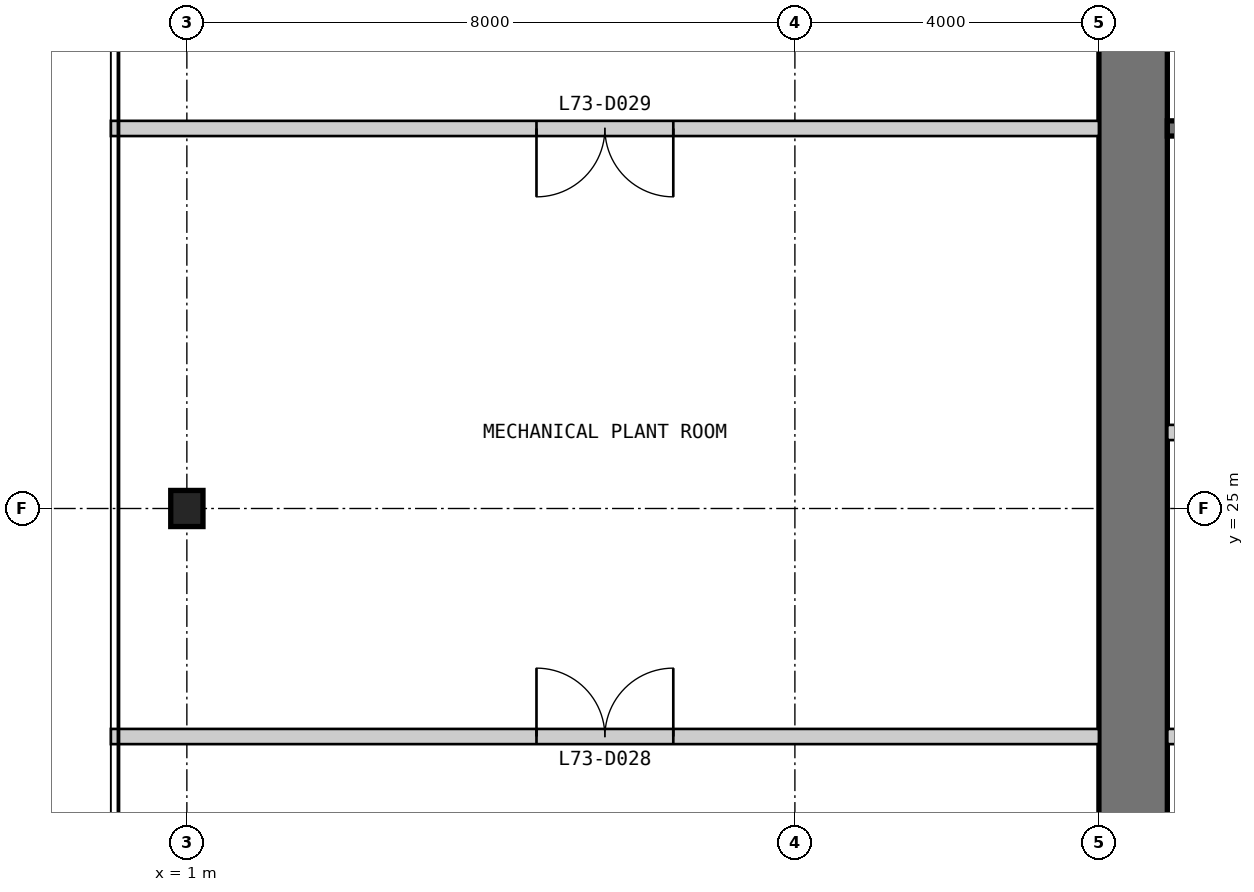
"""IFC4 building model, lengths in metres.
Left out: names, types, materials, properties, quantities, classifications, styles, units other than length and angle.
Written with IfcOpenShell. Run it as: python <this file> out.ifc"""

import sys

from ifc_helpers import new_model, si_unit, direction, frame, frame_2d, origin, origin_2d, place, context, subcontext, project, spatial, polyline, rectangle, i_section, outline, extrude, element, fill, save


model = new_model("IFC4")
c1 = context("Model", 3, precision=1e-05, world=origin(), true_north=direction((0.0, 1.0)))
c2 = subcontext(c1, "Body", "Model", "MODEL_VIEW")
j1 = project(units=[si_unit("LENGTHUNIT", "METRE"), si_unit("PLANEANGLEUNIT", "RADIAN")], contexts=[c1])
p1 = place(None, origin())
s1 = spatial("IfcSite", under=j1, at=p1, CompositionType="ELEMENT")
p2 = place(p1, origin())
s2 = spatial("IfcBuilding", under=s1, at=p2, CompositionType="ELEMENT")
p3 = place(p2, frame((0.0, 0.0, 301.8)))
s3 = spatial("IfcBuildingStorey", under=s2, at=p3, CompositionType="ELEMENT", Elevation=301.8)
p4 = place(p3, frame((1.0, 25.0, 0.0), z_axis=(0.0, 0.0, 1.0), x_axis=(1.0, 0.0, 0.0)))
e1 = element("IfcColumn", 1, at=p4, inside=s3, PredefinedType="COLUMN", context=c2, shape_type="SweptSolid", body=[
    extrude(i_section(OverallWidth=0.424, OverallDepth=0.475, WebThickness=0.048, FlangeThickness=0.077, at=origin_2d()), origin(), (0.0, 0.0, 1.0), 6.0),
])
p5 = place(p3, frame((13.45, 36.1, 0.0), z_axis=(0.0, 0.0, 1.0), x_axis=(0.0, -1.0, 0.0)))
e2 = element("IfcWall", 2, at=p5, inside=s3, PredefinedType="SHEAR", context=c2, shape_type="SweptSolid", body=[
    extrude(outline(polyline([(-0.9, -0.45), (23.1, -0.45), (22.2, 0.45), (0.0, 0.45), (-0.9, -0.45)])), origin(), (0.0, 0.0, 1.0), 6.0),
])
p6 = place(p5, frame((20.2, 0.0, 0.0)))
e3 = element("IfcOpeningElement", 3, at=p6, cuts=e2, PredefinedType="OPENING", context=c2, shape_type="SweptSolid", body=[
    extrude(rectangle(XDim=1.0, YDim=2.2, at=frame_2d((0.5, 1.1))), frame((0.0, 0.46, 0.0), z_axis=(0.0, -1.0, 0.0), x_axis=(1.0, 0.0, 0.0)), (0.0, 0.0, 1.0), 0.92),
])
p7 = place(p5, frame((17.25, 0.0, 0.0)))
e4 = element("IfcOpeningElement", 4, at=p7, cuts=e2, PredefinedType="OPENING", context=c2, shape_type="SweptSolid", body=[
    extrude(rectangle(XDim=0.9, YDim=2.2, at=frame_2d((0.45, 1.1))), frame((0.0, 0.46, 0.0), z_axis=(0.0, -1.0, 0.0), x_axis=(1.0, 0.0, 0.0)), (0.0, 0.0, 1.0), 0.92),
])
for number, where, z_axis, x_axis in (
    (5, (13.9, 22.0, 0.0), (0.0, 0.0, 1.0), (1.0, 0.0, 0.0)),
    (6, (13.9, 26.0, 0.0), (0.0, 0.0, 1.0), (1.0, 0.0, 0.0)),
):
    element("IfcWall", number, at=place(p3, frame(where, z_axis=z_axis, x_axis=x_axis)), inside=s3, PredefinedType="PARTITIONING", context=c2, shape_type="SweptSolid", body=[
        extrude(rectangle(XDim=2.8, YDim=0.2, at=frame_2d((1.4, 0.0))), origin(), (0.0, 0.0, 1.0), 5.8),
    ])
p8 = place(p3, frame((29.7, 30.0, 0.0), z_axis=(0.0, 0.0, 1.0), x_axis=(-1.0, 0.0, 0.0)))
e7 = element("IfcWall", 7, at=p8, inside=s3, PredefinedType="SOLIDWALL", context=c2, shape_type="SweptSolid", body=[
    extrude(rectangle(XDim=15.8, YDim=0.2, at=frame_2d((7.9, 0.0))), origin(), (0.0, 0.0, 1.0), 5.8),
])
p9 = place(p3, frame((0.0, 22.0, 0.0), z_axis=(0.0, 0.0, 1.0), x_axis=(1.0, 0.0, 0.0)))
e8 = element("IfcWall", 8, at=p9, inside=s3, PredefinedType="PARTITIONING", context=c2, shape_type="SweptSolid", body=[
    extrude(rectangle(XDim=13.0, YDim=0.2, at=frame_2d((6.5, 0.0))), origin(), (0.0, 0.0, 1.0), 5.8),
])
p10 = place(p9, frame((5.6, 0.0, 0.0)))
e9 = element("IfcOpeningElement", 9, at=p10, cuts=e8, PredefinedType="OPENING", context=c2, shape_type="SweptSolid", body=[
    extrude(rectangle(XDim=1.8, YDim=2.4, at=frame_2d((0.9, 1.2))), frame((0.0, 0.11, 0.0), z_axis=(0.0, -1.0, 0.0), x_axis=(1.0, 0.0, 0.0)), (0.0, 0.0, 1.0), 0.22),
])
p11 = place(p3, frame((0.0, 30.0, 0.0), z_axis=(0.0, 0.0, 1.0), x_axis=(1.0, 0.0, 0.0)))
e10 = element("IfcWall", 10, at=p11, inside=s3, PredefinedType="PARTITIONING", context=c2, shape_type="SweptSolid", body=[
    extrude(rectangle(XDim=13.0, YDim=0.2, at=frame_2d((6.5, 0.0))), origin(), (0.0, 0.0, 1.0), 5.8),
])
p12 = place(p11, frame((5.6, 0.0, 0.0)))
e11 = element("IfcOpeningElement", 11, at=p12, cuts=e10, PredefinedType="OPENING", context=c2, shape_type="SweptSolid", body=[
    extrude(rectangle(XDim=1.8, YDim=2.4, at=frame_2d((0.9, 1.2))), frame((0.0, 0.11, 0.0), z_axis=(0.0, -1.0, 0.0), x_axis=(1.0, 0.0, 0.0)), (0.0, 0.0, 1.0), 0.22),
])
p13 = place(p10, origin())
e12 = element("IfcDoor", 12, at=p13, inside=s3, OperationType="DOUBLE_DOOR_SINGLE_SWING", PredefinedType="DOOR", context=c2, shape_type="SweptSolid", body=[
    extrude(rectangle(XDim=1.8, YDim=2.4, at=frame_2d((0.9, 1.2))), frame((0.0, 0.025, 0.0), z_axis=(0.0, -1.0, 0.0), x_axis=(1.0, 0.0, 0.0)), (0.0, 0.0, 1.0), 0.05),
])
fill(e9, e12)
p14 = place(p12, frame((1.8, 0.0, 0.0), z_axis=(0.0, 0.0, 1.0), x_axis=(-1.0, 0.0, 0.0)))
e13 = element("IfcDoor", 13, at=p14, inside=s3, OperationType="DOUBLE_DOOR_SINGLE_SWING", PredefinedType="DOOR", context=c2, shape_type="SweptSolid", body=[
    extrude(rectangle(XDim=1.8, YDim=2.4, at=frame_2d((0.9, 1.2))), frame((0.0, 0.025, 0.0), z_axis=(0.0, -1.0, 0.0), x_axis=(1.0, 0.0, 0.0)), (0.0, 0.0, 1.0), 0.05),
])
fill(e11, e13)
save(model, sys.argv[1])
